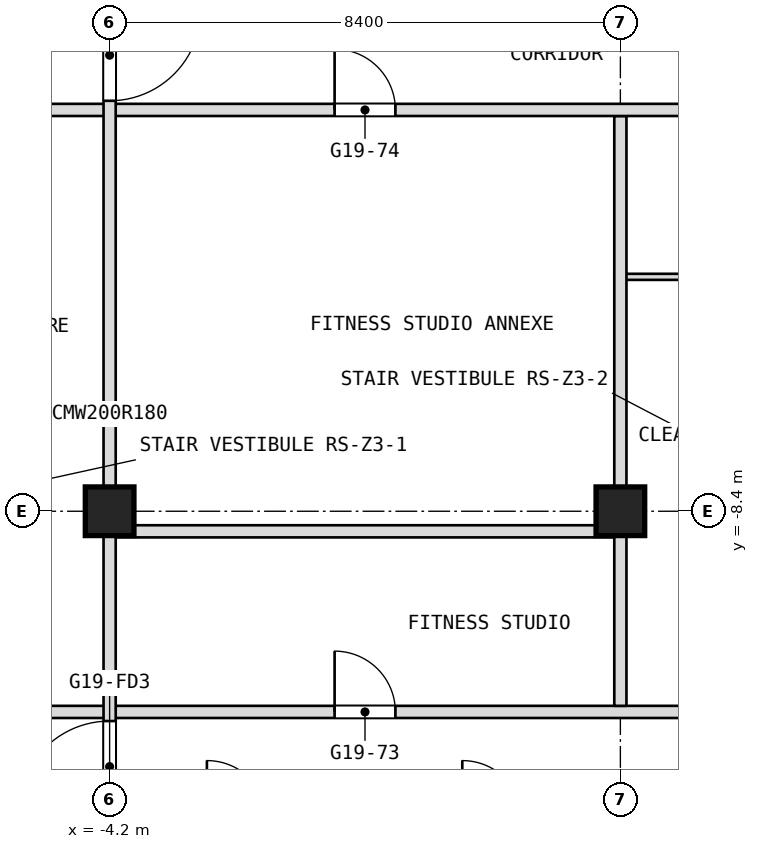
"""IFC4 building model, lengths in metres.
Left out: names, types, materials, properties, quantities, classifications, styles, units other than length and angle.
Written with IfcOpenShell. Run it as: python <this file> out.ifc"""

import sys

from ifc_helpers import new_model, si_unit, direction, frame, frame_2d, origin, origin_2d, place, context, subcontext, project, spatial, rectangle, extrude, element, fill, save


model = new_model("IFC4")
c1 = context("Model", 3, precision=1e-05, world=origin(), true_north=direction((0.0, 1.0)))
c2 = subcontext(c1, "Body", "Model", "MODEL_VIEW")
j1 = project(units=[si_unit("LENGTHUNIT", "METRE"), si_unit("PLANEANGLEUNIT", "RADIAN")], contexts=[c1])
p1 = place(None, origin())
s1 = spatial("IfcSite", under=j1, at=p1, CompositionType="ELEMENT")
p2 = place(p1, origin())
s2 = spatial("IfcBuilding", under=s1, at=p2, CompositionType="ELEMENT")
p3 = place(p2, frame((0.0, 0.0, 223.7)))
s3 = spatial("IfcBuildingStorey", under=s2, at=p3, CompositionType="ELEMENT", Elevation=223.7)
for number, where, z_axis, x_axis in (
    (1, (-4.2, -8.4, 0.0), (0.0, 0.0, 1.0), (1.0, 0.0, 0.0)),
    (2, (4.2, -8.4, 0.0), (0.0, 0.0, 1.0), (1.0, 0.0, 0.0)),
):
    element("IfcColumn", number, at=place(p3, frame(where, z_axis=z_axis, x_axis=x_axis)), inside=s3, PredefinedType="COLUMN", context=c2, shape_type="SweptSolid", body=[
        extrude(rectangle(XDim=0.8, YDim=0.8, at=origin_2d()), origin(), (0.0, 0.0, 1.0), 3.6),
    ])
p4 = place(p3, frame((-7.3, -11.7, 0.0), z_axis=(0.0, 0.0, 1.0), x_axis=(1.0, 0.0, 0.0)))
e3 = element("IfcWall", 3, at=p4, inside=s3, PredefinedType="PARTITIONING", context=c2, shape_type="SweptSolid", body=[
    extrude(rectangle(XDim=14.6, YDim=0.2, at=frame_2d((7.3, 0.0))), origin(), (0.0, 0.0, 1.0), 3.34),
])
p5 = place(p4, frame((6.8, 0.0, 0.0)))
e4 = element("IfcOpeningElement", 4, at=p5, cuts=e3, PredefinedType="OPENING", context=c2, shape_type="SweptSolid", body=[
    extrude(rectangle(XDim=1.0, YDim=2.1, at=frame_2d((0.5, 1.05))), frame((0.0, 0.1, 0.0), z_axis=(0.0, -1.0, 0.0), x_axis=(1.0, 0.0, 0.0)), (0.0, 0.0, 1.0), 0.2),
])
p6 = place(p3, frame((-4.1, -8.73, 0.0), z_axis=(0.0, 0.0, 1.0), x_axis=(1.0, 0.0, 0.0)))
e5 = element("IfcWall", 5, at=p6, inside=s3, PredefinedType="PARTITIONING", context=c2, shape_type="SweptSolid", body=[
    extrude(rectangle(XDim=8.2, YDim=0.2, at=frame_2d((4.1, 0.0))), origin(), (0.0, 0.0, 1.0), 3.34),
])
p7 = place(p3, frame((4.1, -4.545, 0.0), z_axis=(0.0, 0.0, 1.0), x_axis=(1.0, 0.0, 0.0)))
e6 = element("IfcWall", 6, at=p7, inside=s3, PredefinedType="PARTITIONING", context=c2, shape_type="SweptSolid", body=[
    extrude(rectangle(XDim=4.4, YDim=0.1, at=frame_2d((2.2, 0.0))), origin(), (0.0, 0.0, 1.0), 3.34),
])
p8 = place(p7, frame((1.75, 0.0, 0.0)))
e7 = element("IfcOpeningElement", 7, at=p8, cuts=e6, PredefinedType="OPENING", context=c2, shape_type="SweptSolid", body=[
    extrude(rectangle(XDim=0.9, YDim=2.1, at=frame_2d((0.45, 1.05))), frame((0.0, 0.05, 0.0), z_axis=(0.0, -1.0, 0.0), x_axis=(1.0, 0.0, 0.0)), (0.0, 0.0, 1.0), 0.1),
])
p9 = place(p3, frame((4.2, -11.6, 0.0), z_axis=(0.0, 0.0, 1.0), x_axis=(0.0, 1.0, 0.0)))
e8 = element("IfcWall", 8, at=p9, inside=s3, PredefinedType="PARTITIONING", context=c2, shape_type="SweptSolid", body=[
    extrude(rectangle(XDim=9.7, YDim=0.2, at=frame_2d((4.85, 0.0))), origin(), (0.0, 0.0, 1.0), 3.34),
])
p10 = place(p3, frame((-16.9, -1.8, 0.0), z_axis=(0.0, 0.0, 1.0), x_axis=(1.0, 0.0, 0.0)))
e9 = element("IfcWall", 9, at=p10, inside=s3, PredefinedType="PARTITIONING", context=c2, shape_type="SweptSolid", body=[
    extrude(rectangle(XDim=33.8, YDim=0.2, at=frame_2d((16.9, 0.0))), origin(), (0.0, 0.0, 1.0), 3.34),
])
p11 = place(p10, frame((1.7, 0.0, 0.0)))
e10 = element("IfcOpeningElement", 10, at=p11, cuts=e9, PredefinedType="OPENING", context=c2, shape_type="SweptSolid", body=[
    extrude(rectangle(XDim=1.0, YDim=2.1, at=frame_2d((0.5, 1.05))), frame((0.0, 0.1, 0.0), z_axis=(0.0, -1.0, 0.0), x_axis=(1.0, 0.0, 0.0)), (0.0, 0.0, 1.0), 0.2),
])
p12 = place(p10, frame((5.9, 0.0, 0.0)))
e11 = element("IfcOpeningElement", 11, at=p12, cuts=e9, PredefinedType="OPENING", context=c2, shape_type="SweptSolid", body=[
    extrude(rectangle(XDim=1.0, YDim=2.1, at=frame_2d((0.5, 1.05))), frame((0.0, 0.1, 0.0), z_axis=(0.0, -1.0, 0.0), x_axis=(1.0, 0.0, 0.0)), (0.0, 0.0, 1.0), 0.2),
])
p13 = place(p10, frame((10.1, 0.0, 0.0)))
e12 = element("IfcOpeningElement", 12, at=p13, cuts=e9, PredefinedType="OPENING", context=c2, shape_type="SweptSolid", body=[
    extrude(rectangle(XDim=1.0, YDim=2.1, at=frame_2d((0.5, 1.05))), frame((0.0, 0.1, 0.0), z_axis=(0.0, -1.0, 0.0), x_axis=(1.0, 0.0, 0.0)), (0.0, 0.0, 1.0), 0.2),
])
p14 = place(p10, frame((22.7, 0.0, 0.0)))
e13 = element("IfcOpeningElement", 13, at=p14, cuts=e9, PredefinedType="OPENING", context=c2, shape_type="SweptSolid", body=[
    extrude(rectangle(XDim=1.0, YDim=2.1, at=frame_2d((0.5, 1.05))), frame((0.0, 0.1, 0.0), z_axis=(0.0, -1.0, 0.0), x_axis=(1.0, 0.0, 0.0)), (0.0, 0.0, 1.0), 0.2),
])
p15 = place(p10, frame((26.9, 0.0, 0.0)))
e14 = element("IfcOpeningElement", 14, at=p15, cuts=e9, PredefinedType="OPENING", context=c2, shape_type="SweptSolid", body=[
    extrude(rectangle(XDim=1.0, YDim=2.1, at=frame_2d((0.5, 1.05))), frame((0.0, 0.1, 0.0), z_axis=(0.0, -1.0, 0.0), x_axis=(1.0, 0.0, 0.0)), (0.0, 0.0, 1.0), 0.2),
])
p16 = place(p10, frame((31.1, 0.0, 0.0)))
e15 = element("IfcOpeningElement", 15, at=p16, cuts=e9, PredefinedType="OPENING", context=c2, shape_type="SweptSolid", body=[
    extrude(rectangle(XDim=1.0, YDim=2.1, at=frame_2d((0.5, 1.05))), frame((0.0, 0.1, 0.0), z_axis=(0.0, -1.0, 0.0), x_axis=(1.0, 0.0, 0.0)), (0.0, 0.0, 1.0), 0.2),
])
p17 = place(p10, frame((16.4, 0.0, 0.0)))
e16 = element("IfcOpeningElement", 16, at=p17, cuts=e9, PredefinedType="OPENING", context=c2, shape_type="SweptSolid", body=[
    extrude(rectangle(XDim=1.0, YDim=2.1, at=frame_2d((0.5, 1.05))), frame((0.0, 0.1, 0.0), z_axis=(0.0, -1.0, 0.0), x_axis=(1.0, 0.0, 0.0)), (0.0, 0.0, 1.0), 0.2),
])
p18 = place(p3, frame((-4.2, -13.6, 0.0), z_axis=(0.0, 0.0, 1.0), x_axis=(0.0, 1.0, 0.0)))
e17 = element("IfcWall", 17, at=p18, inside=s3, PredefinedType="PARTITIONING", context=c2, shape_type="SweptSolid", body=[
    extrude(rectangle(XDim=13.6, YDim=0.2, at=frame_2d((6.8, 0.0))), origin(), (0.0, 0.0, 1.0), 3.34),
])
p19 = place(p18, frame((11.95, 0.0, 0.0)))
e18 = element("IfcOpeningElement", 18, at=p19, cuts=e17, PredefinedType="OPENING", context=c2, shape_type="SweptSolid", body=[
    extrude(rectangle(XDim=1.5, YDim=2.1, at=frame_2d((0.75, 1.05))), frame((0.0, 0.1, 0.0), z_axis=(0.0, -1.0, 0.0), x_axis=(1.0, 0.0, 0.0)), (0.0, 0.0, 1.0), 0.2),
])
p20 = place(p18, frame((0.25, 0.0, 0.0)))
e19 = element("IfcOpeningElement", 19, at=p20, cuts=e17, PredefinedType="OPENING", context=c2, shape_type="SweptSolid", body=[
    extrude(rectangle(XDim=1.5, YDim=2.1, at=frame_2d((0.75, 1.05))), frame((0.0, 0.1, 0.0), z_axis=(0.0, -1.0, 0.0), x_axis=(1.0, 0.0, 0.0)), (0.0, 0.0, 1.0), 0.2),
])
p21 = place(p5, origin())
e20 = element("IfcDoor", 20, at=p21, inside=s3, OperationType="SINGLE_SWING_LEFT", PredefinedType="DOOR", context=c2, shape_type="SweptSolid", body=[
    extrude(rectangle(XDim=1.0, YDim=2.1, at=frame_2d((0.5, 1.05))), frame((0.0, 0.025, 0.0), z_axis=(0.0, -1.0, 0.0), x_axis=(1.0, 0.0, 0.0)), (0.0, 0.0, 1.0), 0.05),
])
fill(e4, e20)
p22 = place(p17, origin())
e21 = element("IfcDoor", 21, at=p22, inside=s3, OperationType="SINGLE_SWING_LEFT", PredefinedType="DOOR", context=c2, shape_type="SweptSolid", body=[
    extrude(rectangle(XDim=1.0, YDim=2.1, at=frame_2d((0.5, 1.05))), frame((0.0, 0.025, 0.0), z_axis=(0.0, -1.0, 0.0), x_axis=(1.0, 0.0, 0.0)), (0.0, 0.0, 1.0), 0.05),
])
fill(e16, e21)
p23 = place(p19, origin())
e22 = element("IfcDoor", 22, at=p23, inside=s3, OperationType="DOUBLE_DOOR_DOUBLE_SWING", PredefinedType="DOOR", context=c2, shape_type="SweptSolid", body=[
    extrude(rectangle(XDim=1.5, YDim=2.1, at=frame_2d((0.75, 1.05))), frame((0.0, 0.025, 0.0), z_axis=(0.0, -1.0, 0.0), x_axis=(1.0, 0.0, 0.0)), (0.0, 0.0, 1.0), 0.05),
])
fill(e18, e22)
p24 = place(p20, origin())
e23 = element("IfcDoor", 23, at=p24, inside=s3, OperationType="DOUBLE_DOOR_DOUBLE_SWING", PredefinedType="DOOR", context=c2, shape_type="SweptSolid", body=[
    extrude(rectangle(XDim=1.5, YDim=2.1, at=frame_2d((0.75, 1.05))), frame((0.0, 0.025, 0.0), z_axis=(0.0, -1.0, 0.0), x_axis=(1.0, 0.0, 0.0)), (0.0, 0.0, 1.0), 0.05),
])
fill(e19, e23)
save(model, sys.argv[1])
